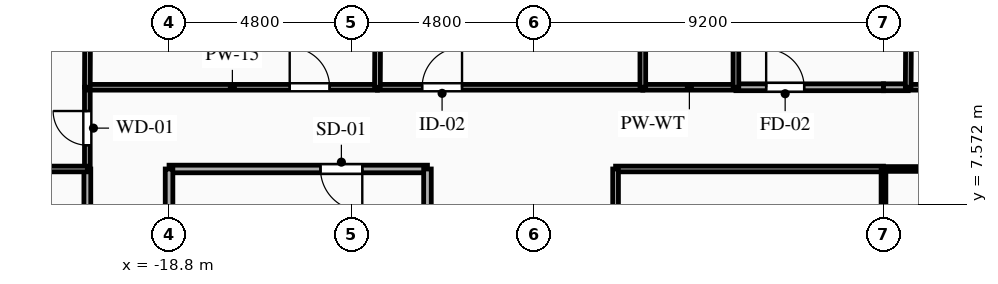
"""IFC4 building model, lengths in metres.
Left out: names, types, materials, properties, quantities, classifications, styles, units other than length and angle.
Written with IfcOpenShell. Run it as: python <this file> out.ifc"""

import sys

from ifc_helpers import new_model, si_unit, direction, frame, frame_2d, origin, place, context, subcontext, project, spatial, rectangle, extrude, element, fill, save


model = new_model("IFC4")
c1 = context("Model", 3, precision=1e-05, world=origin(), true_north=direction((0.0, 1.0)))
c2 = subcontext(c1, "Body", "Model", "MODEL_VIEW")
j1 = project(units=[si_unit("LENGTHUNIT", "METRE"), si_unit("PLANEANGLEUNIT", "RADIAN")], contexts=[c1])
p1 = place(None, origin())
s1 = spatial("IfcSite", under=j1, at=p1, CompositionType="ELEMENT")
p2 = place(p1, origin())
s2 = spatial("IfcBuilding", under=s1, at=p2, CompositionType="ELEMENT")
p3 = place(p2, frame((0.0, 0.0, 179.65)))
s3 = spatial("IfcBuildingStorey", under=s2, at=p3, CompositionType="ELEMENT", Elevation=179.65)
p4 = place(p3, frame((-12.0, 8.5, 0.0), z_axis=(0.0, 0.0, 1.0), x_axis=(-1.0, 0.0, 0.0)))
e1 = element("IfcWall", 1, at=p4, inside=s3, PredefinedType="PARTITIONING", context=c2, shape_type="SweptSolid", body=[
    extrude(rectangle(XDim=6.8, YDim=0.2, at=frame_2d((3.4, 0.0))), origin(), (0.0, 0.0, 1.0), 3.04),
])
p5 = place(p4, frame((1.715, 0.0, 0.0)))
e2 = element("IfcOpeningElement", 2, at=p5, cuts=e1, PredefinedType="OPENING", context=c2, shape_type="SweptSolid", body=[
    extrude(rectangle(XDim=1.1, YDim=2.15, at=frame_2d((0.55, 1.075))), frame((0.0, 0.11, 0.0), z_axis=(0.0, -1.0, 0.0), x_axis=(1.0, 0.0, 0.0)), (0.0, 0.0, 1.0), 0.22),
])
p6 = place(p3, frame((-18.8, 8.5, 0.0), z_axis=(0.0, 0.0, 1.0), x_axis=(0.0, -1.0, 0.0)))
e3 = element("IfcWall", 3, at=p6, inside=s3, PredefinedType="PARTITIONING", context=c2, shape_type="SweptSolid", body=[
    extrude(rectangle(XDim=2.9, YDim=0.2, at=frame_2d((1.45, 0.0))), origin(), (0.0, 0.0, 1.0), 2.665),
])
p7 = place(p3, frame((-12.0, 5.6, 0.0), z_axis=(0.0, 0.0, 1.0), x_axis=(0.0, 1.0, 0.0)))
e4 = element("IfcWall", 4, at=p7, inside=s3, PredefinedType="PARTITIONING", context=c2, shape_type="SweptSolid", body=[
    extrude(rectangle(XDim=2.9, YDim=0.2, at=frame_2d((1.45, 0.0))), origin(), (0.0, 0.0, 1.0), 3.04),
])
p8 = place(p3, frame((-20.95, 8.5, 0.0), z_axis=(0.0, 0.0, 1.0), x_axis=(0.0, 1.0, 0.0)))
e5 = element("IfcWall", 5, at=p8, inside=s3, PredefinedType="PARTITIONING", context=c2, shape_type="SweptSolid", body=[
    extrude(rectangle(XDim=2.15, YDim=0.15, at=frame_2d((1.075, 0.0))), origin(), (0.0, 0.0, 1.0), 3.04),
])
p9 = place(p8, frame((0.625, 0.0, 0.0)))
e6 = element("IfcOpeningElement", 6, at=p9, cuts=e5, PredefinedType="OPENING", context=c2, shape_type="SweptSolid", body=[
    extrude(rectangle(XDim=0.9, YDim=2.1, at=frame_2d((0.45, 1.05))), frame((0.0, 0.085, 0.0), z_axis=(0.0, -1.0, 0.0), x_axis=(1.0, 0.0, 0.0)), (0.0, 0.0, 1.0), 0.17),
])
p10 = place(p3, frame((-20.95, 10.65, 0.0), z_axis=(0.0, 0.0, 1.0), x_axis=(1.0, 0.0, 0.0)))
e7 = element("IfcWall", 7, at=p10, inside=s3, PredefinedType="PARTITIONING", context=c2, shape_type="SweptSolid", body=[
    extrude(rectangle(XDim=7.633, YDim=0.15, at=frame_2d((3.816, 0.0))), origin(), (0.0, 0.0, 1.0), 3.04),
])
p11 = place(p10, frame((5.325, 0.0, 0.0)))
e8 = element("IfcOpeningElement", 8, at=p11, cuts=e7, PredefinedType="OPENING", context=c2, shape_type="SweptSolid", body=[
    extrude(rectangle(XDim=1.05, YDim=2.15, at=frame_2d((0.525, 1.075))), frame((0.0, 0.085, 0.0), z_axis=(0.0, -1.0, 0.0), x_axis=(1.0, 0.0, 0.0)), (0.0, 0.0, 1.0), 0.17),
])
p12 = place(p3, frame((-13.317, 10.65, 0.0), z_axis=(0.0, 0.0, 1.0), x_axis=(1.0, 0.0, 0.0)))
e9 = element("IfcWall", 9, at=p12, inside=s3, PredefinedType="PARTITIONING", context=c2, shape_type="SweptSolid", body=[
    extrude(rectangle(XDim=6.984, YDim=0.15, at=frame_2d((3.492, 0.0))), origin(), (0.0, 0.0, 1.0), 3.04),
])
p13 = place(p12, frame((1.177, 0.0, 0.0)))
e10 = element("IfcOpeningElement", 10, at=p13, cuts=e9, PredefinedType="OPENING", context=c2, shape_type="SweptSolid", body=[
    extrude(rectangle(XDim=1.05, YDim=2.15, at=frame_2d((0.525, 1.075))), frame((0.0, 0.085, 0.0), z_axis=(0.0, -1.0, 0.0), x_axis=(1.0, 0.0, 0.0)), (0.0, 0.0, 1.0), 0.17),
])
p14 = place(p3, frame((-3.883, 10.65, 0.0), z_axis=(0.0, 0.0, 1.0), x_axis=(1.0, 0.0, 0.0)))
e11 = element("IfcWall", 11, at=p14, inside=s3, PredefinedType="PARTITIONING", context=c2, shape_type="SweptSolid", body=[
    extrude(rectangle(XDim=3.883, YDim=0.18, at=frame_2d((1.941, 0.0))), origin(), (0.0, 0.0, 1.0), 3.04),
])
p15 = place(p14, frame((0.795, 0.0, 0.0)))
e12 = element("IfcOpeningElement", 12, at=p15, cuts=e11, PredefinedType="OPENING", context=c2, shape_type="SweptSolid", body=[
    extrude(rectangle(XDim=1.0, YDim=2.15, at=frame_2d((0.5, 1.075))), frame((0.0, 0.1, 0.0), z_axis=(0.0, -1.0, 0.0), x_axis=(1.0, 0.0, 0.0)), (0.0, 0.0, 1.0), 0.2),
])
p16 = place(p3, frame((-6.333, 10.65, 0.0), z_axis=(0.0, 0.0, 1.0), x_axis=(1.0, 0.0, 0.0)))
e13 = element("IfcWall", 13, at=p16, inside=s3, PredefinedType="PLUMBINGWALL", context=c2, shape_type="SweptSolid", body=[
    extrude(rectangle(XDim=2.45, YDim=0.15, at=frame_2d((1.225, 0.0))), origin(), (0.0, 0.0, 1.0), 3.04),
])
p17 = place(p3, frame((0.0, 8.5, 0.0), z_axis=(0.0, 0.0, 1.0), x_axis=(-1.0, 0.0, 0.0)))
e14 = element("IfcWall", 14, at=p17, inside=s3, PredefinedType="PARTITIONING", context=c2, shape_type="SweptSolid", body=[
    extrude(rectangle(XDim=7.05, YDim=0.15, at=frame_2d((3.525, 0.0))), origin(), (0.0, 0.0, 1.0), 3.04),
])
p18 = place(p3, frame((0.0, 10.65, 0.0), z_axis=(0.0, 0.0, 1.0), x_axis=(1.0, 0.0, 0.0)))
e15 = element("IfcWall", 15, at=p18, inside=s3, PredefinedType="PARTITIONING", context=c2, shape_type="SweptSolid", body=[
    extrude(rectangle(XDim=0.65, YDim=0.18, at=frame_2d((0.325, 0.0))), origin(), (0.0, 0.0, 1.0), 3.04),
])
p19 = place(p3, frame((0.65, 10.65, 0.0), z_axis=(0.0, 0.0, 1.0), x_axis=(1.0, 0.0, 0.0)))
e16 = element("IfcWall", 16, at=p19, inside=s3, PredefinedType="PARTITIONING", context=c2, shape_type="SweptSolid", body=[
    extrude(rectangle(XDim=6.983, YDim=0.15, at=frame_2d((3.492, 0.0))), origin(), (0.0, 0.0, 1.0), 3.04),
])
p20 = place(p19, frame((1.177, 0.0, 0.0)))
e17 = element("IfcOpeningElement", 17, at=p20, cuts=e16, PredefinedType="OPENING", context=c2, shape_type="SweptSolid", body=[
    extrude(rectangle(XDim=1.05, YDim=2.15, at=frame_2d((0.525, 1.075))), frame((0.0, 0.085, 0.0), z_axis=(0.0, -1.0, 0.0), x_axis=(1.0, 0.0, 0.0)), (0.0, 0.0, 1.0), 0.17),
])
p21 = place(p3, frame((7.05, 8.5, 0.0), z_axis=(0.0, 0.0, 1.0), x_axis=(-1.0, 0.0, 0.0)))
e18 = element("IfcWall", 18, at=p21, inside=s3, PredefinedType="PARTITIONING", context=c2, shape_type="SweptSolid", body=[
    extrude(rectangle(XDim=7.05, YDim=0.125, at=frame_2d((3.525, 0.0))), origin(), (0.0, 0.0, 1.0), 3.04),
])
p22 = place(p3, frame((-20.95, -5.6, 0.0), z_axis=(0.0, 0.0, 1.0), x_axis=(0.0, 1.0, 0.0)))
e19 = element("IfcWall", 19, at=p22, inside=s3, PredefinedType="PARTITIONING", context=c2, shape_type="SweptSolid", body=[
    extrude(rectangle(XDim=14.1, YDim=0.18, at=frame_2d((7.05, 0.0))), origin(), (0.0, 0.0, 1.0), 3.04),
])
p23 = place(p22, frame((5.058, 0.0, 0.0)))
e20 = element("IfcOpeningElement", 20, at=p23, cuts=e19, PredefinedType="OPENING", context=c2, shape_type="SweptSolid", body=[
    extrude(rectangle(XDim=1.0, YDim=2.15, at=frame_2d((0.5, 1.075))), frame((0.0, 0.1, 0.0), z_axis=(0.0, -1.0, 0.0), x_axis=(1.0, 0.0, 0.0)), (0.0, 0.0, 1.0), 0.2),
])
p24 = place(p3, frame((-7.05, 8.5, 0.0), z_axis=(0.0, 0.0, 1.0), x_axis=(0.0, -1.0, 0.0)))
e21 = element("IfcWall", 21, at=p24, inside=s3, PredefinedType="PARTITIONING", context=c2, shape_type="SweptSolid", body=[
    extrude(rectangle(XDim=9.3, YDim=0.15, at=frame_2d((4.65, 0.0))), origin(), (0.0, 0.0, 1.0), 3.04),
])
p25 = place(p24, frame((6.784, 0.0, 0.0)))
e22 = element("IfcOpeningElement", 22, at=p25, cuts=e21, PredefinedType="OPENING", context=c2, shape_type="SweptSolid", body=[
    extrude(rectangle(XDim=1.05, YDim=2.15, at=frame_2d((0.525, 1.075))), frame((0.0, 0.085, 0.0), z_axis=(0.0, -1.0, 0.0), x_axis=(1.0, 0.0, 0.0)), (0.0, 0.0, 1.0), 0.17),
])
p26 = place(p3, frame((-23.6, 8.5, 0.0), z_axis=(0.0, 0.0, 1.0), x_axis=(1.0, 0.0, 0.0)))
e23 = element("IfcWall", 23, at=p26, inside=s3, PredefinedType="PARTITIONING", context=c2, shape_type="SweptSolid", body=[
    extrude(rectangle(XDim=2.65, YDim=0.15, at=frame_2d((1.325, 0.0))), origin(), (0.0, 0.0, 1.0), 3.04),
])
p27 = place(p26, frame((0.635, 0.0, 0.0)))
e24 = element("IfcOpeningElement", 24, at=p27, cuts=e23, PredefinedType="OPENING", context=c2, shape_type="SweptSolid", body=[
    extrude(rectangle(XDim=1.05, YDim=2.15, at=frame_2d((0.525, 1.075))), frame((0.0, 0.085, 0.0), z_axis=(0.0, -1.0, 0.0), x_axis=(1.0, 0.0, 0.0)), (0.0, 0.0, 1.0), 0.17),
])
p28 = place(p3, frame((-20.906, 19.662, 0.0), z_axis=(0.0, 0.0, 1.0), x_axis=(-0.004876272857, -0.999988110911, 0.0)))
e25 = element("IfcWall", 25, at=p28, inside=s3, PredefinedType="PARTITIONING", context=c2, shape_type="SweptSolid", body=[
    extrude(rectangle(XDim=9.012, YDim=0.15, at=frame_2d((4.506, 0.0))), origin(), (0.0, 0.0, 1.0), 2.665),
])
p29 = place(p3, frame((-13.273, 18.86, 0.0), z_axis=(0.0, 0.0, 1.0), x_axis=(-0.005323028044, -0.999985832586, 0.0)))
e26 = element("IfcWall", 26, at=p29, inside=s3, PredefinedType="PARTITIONING", context=c2, shape_type="SweptSolid", body=[
    extrude(rectangle(XDim=8.21, YDim=0.15, at=frame_2d((4.105, 0.0))), origin(), (0.0, 0.0, 1.0), 3.04),
])
for number, where, z_axis, x_axis in (
    (27, (-6.333, 12.8, 0.0), (0.0, 0.0, 1.0), (0.0, -1.0, 0.0)),
    (28, (-3.883, 10.65, 0.0), (0.0, 0.0, 1.0), (0.0, 1.0, 0.0)),
):
    element("IfcWall", number, at=place(p3, frame(where, z_axis=z_axis, x_axis=x_axis)), inside=s3, PredefinedType="PLUMBINGWALL", context=c2, shape_type="SweptSolid", body=[
        extrude(rectangle(XDim=2.15, YDim=0.15, at=frame_2d((1.075, 0.0))), origin(), (0.0, 0.0, 1.0), 3.04),
    ])
p30 = place(p3, frame((0.694, 17.392, 0.0), z_axis=(0.0, 0.0, 1.0), x_axis=(-0.0065182942, -0.999978755695, 0.0)))
e29 = element("IfcWall", 29, at=p30, inside=s3, PredefinedType="PARTITIONING", context=c2, shape_type="SweptSolid", body=[
    extrude(rectangle(XDim=6.742, YDim=0.15, at=frame_2d((3.371, 0.0))), origin(), (0.0, 0.0, 1.0), 3.04),
])
p31 = place(p3, frame((0.0, 8.5, 0.0), z_axis=(0.0, 0.0, 1.0), x_axis=(0.0, -1.0, 0.0)))
e30 = element("IfcWall", 30, at=p31, inside=s3, PredefinedType="PARTITIONING", context=c2, shape_type="SweptSolid", body=[
    extrude(rectangle(XDim=9.3, YDim=0.125, at=frame_2d((4.65, 0.0))), origin(), (0.0, 0.0, 1.0), 3.04),
])
p32 = place(p5, origin())
e31 = element("IfcDoor", 31, at=p32, inside=s3, OperationType="SINGLE_SWING_LEFT", PredefinedType="DOOR", context=c2, shape_type="SweptSolid", body=[
    extrude(rectangle(XDim=1.1, YDim=2.15, at=frame_2d((0.55, 1.075))), frame((0.0, 0.025, 0.0), z_axis=(0.0, -1.0, 0.0), x_axis=(1.0, 0.0, 0.0)), (0.0, 0.0, 1.0), 0.05),
])
fill(e2, e31)
p33 = place(p9, origin())
e32 = element("IfcDoor", 32, at=p33, inside=s3, OperationType="SINGLE_SWING_RIGHT", PredefinedType="DOOR", context=c2, shape_type="SweptSolid", body=[
    extrude(rectangle(XDim=0.9, YDim=2.1, at=frame_2d((0.45, 1.05))), frame((0.0, 0.025, 0.0), z_axis=(0.0, -1.0, 0.0), x_axis=(1.0, 0.0, 0.0)), (0.0, 0.0, 1.0), 0.05),
])
fill(e6, e32)
p34 = place(p11, origin())
e33 = element("IfcDoor", 33, at=p34, inside=s3, OperationType="SINGLE_SWING_LEFT", PredefinedType="DOOR", context=c2, shape_type="SweptSolid", body=[
    extrude(rectangle(XDim=1.05, YDim=2.15, at=frame_2d((0.525, 1.075))), frame((0.0, 0.025, 0.0), z_axis=(0.0, -1.0, 0.0), x_axis=(1.0, 0.0, 0.0)), (0.0, 0.0, 1.0), 0.05),
])
fill(e8, e33)
p35 = place(p13, origin())
e34 = element("IfcDoor", 34, at=p35, inside=s3, OperationType="SINGLE_SWING_RIGHT", PredefinedType="DOOR", context=c2, shape_type="SweptSolid", body=[
    extrude(rectangle(XDim=1.05, YDim=2.15, at=frame_2d((0.525, 1.075))), frame((0.0, 0.025, 0.0), z_axis=(0.0, -1.0, 0.0), x_axis=(1.0, 0.0, 0.0)), (0.0, 0.0, 1.0), 0.05),
])
fill(e10, e34)
p36 = place(p15, origin())
e35 = element("IfcDoor", 35, at=p36, inside=s3, OperationType="SINGLE_SWING_LEFT", PredefinedType="DOOR", context=c2, shape_type="SweptSolid", body=[
    extrude(rectangle(XDim=1.0, YDim=2.15, at=frame_2d((0.5, 1.075))), frame((0.0, 0.025, 0.0), z_axis=(0.0, -1.0, 0.0), x_axis=(1.0, 0.0, 0.0)), (0.0, 0.0, 1.0), 0.05),
])
fill(e12, e35)
save(model, sys.argv[1])
